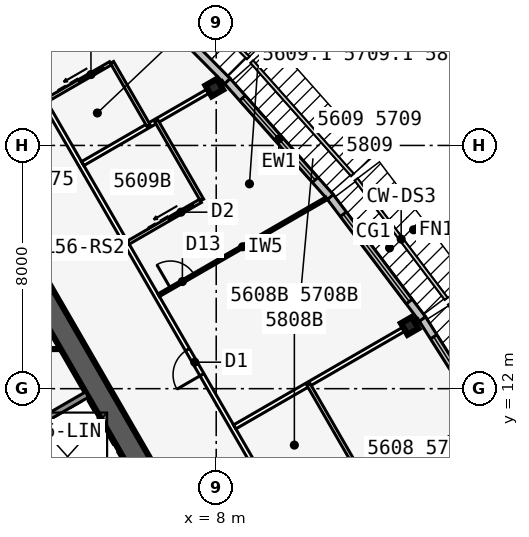
"""IFC4 building model, lengths in metres.
Left out: names, types, materials, properties, quantities, classifications, styles, units other than length and angle.
Written with IfcOpenShell. Run it as: python <this file> out.ifc"""

import sys

from ifc_helpers import new_model, si_unit, direction, frame, frame_2d, origin, origin_2d, place, context, subcontext, project, spatial, rectangle, i_section, extrude, element, fill, save


model = new_model("IFC4")
c1 = context("Model", 3, precision=1e-05, world=origin(), true_north=direction((0.0, 1.0)))
c2 = subcontext(c1, "Body", "Model", "MODEL_VIEW")
j1 = project(units=[si_unit("LENGTHUNIT", "METRE"), si_unit("PLANEANGLEUNIT", "RADIAN")], contexts=[c1])
p1 = place(None, origin())
s1 = spatial("IfcSite", under=j1, at=p1, CompositionType="ELEMENT")
p2 = place(p1, origin())
s2 = spatial("IfcBuilding", under=s1, at=p2, CompositionType="ELEMENT")
p3 = place(p2, frame((0.0, 0.0, 211.7)))
s3 = spatial("IfcBuildingStorey", under=s2, at=p3, CompositionType="ELEMENT", Elevation=211.7)
p4 = place(p3, frame((16.5, -9.526, 0.0), z_axis=(0.0, 0.0, 1.0), x_axis=(-0.499999749417, 0.866025548458, 0.0)))
e1 = element("IfcWall", 1, at=p4, inside=s3, PredefinedType="SHEAR", context=c2, shape_type="SweptSolid", body=[
    extrude(rectangle(XDim=33.0, YDim=0.75, at=frame_2d((16.5, 0.0))), origin(), (0.0, 0.0, 1.0), 3.6),
])
p5 = place(p4, frame((14.15, 0.0, 0.0)))
e2 = element("IfcOpeningElement", 2, at=p5, cuts=e1, PredefinedType="OPENING", context=c2, shape_type="SweptSolid", body=[
    extrude(rectangle(XDim=1.8, YDim=2.13, at=frame_2d((0.9, 1.065))), frame((0.0, 0.385, 0.0), z_axis=(0.0, -1.0, 0.0), x_axis=(1.0, 0.0, 0.0)), (0.0, 0.0, 1.0), 0.77),
])
p6 = place(p4, frame((12.6, 0.0, 0.0)))
e3 = element("IfcOpeningElement", 3, at=p6, cuts=e1, PredefinedType="OPENING", context=c2, shape_type="SweptSolid", body=[
    extrude(rectangle(XDim=1.0, YDim=2.13, at=frame_2d((0.5, 1.065))), frame((0.0, 0.385, 0.0), z_axis=(0.0, -1.0, 0.0), x_axis=(1.0, 0.0, 0.0)), (0.0, 0.0, 1.0), 0.77),
])
p7 = place(p3, frame((5.379, 2.586, 0.0), z_axis=(0.0, 0.0, 1.0), x_axis=(-0.500001375892, 0.866024609411, 0.0)))
e4 = element("IfcWall", 4, at=p7, inside=s3, PredefinedType="SOLIDWALL", context=c2, shape_type="SweptSolid", body=[
    extrude(rectangle(XDim=10.633, YDim=0.25, at=frame_2d((5.316, 0.0))), origin(), (0.0, 0.0, 1.0), 3.435),
])
p8 = place(p7, frame((9.164, 0.0, 0.0)))
e5 = element("IfcOpeningElement", 5, at=p8, cuts=e4, PredefinedType="OPENING", context=c2, shape_type="SweptSolid", body=[
    extrude(rectangle(XDim=0.9, YDim=2.13, at=frame_2d((0.45, 1.065))), frame((0.0, 0.135, 0.0), z_axis=(0.0, -1.0, 0.0), x_axis=(1.0, 0.0, 0.0)), (0.0, 0.0, 1.0), 0.27),
])
p9 = place(p7, frame((1.0, 0.0, 0.0)))
e6 = element("IfcOpeningElement", 6, at=p9, cuts=e4, PredefinedType="OPENING", context=c2, shape_type="SweptSolid", body=[
    extrude(rectangle(XDim=1.1, YDim=2.13, at=frame_2d((0.55, 1.065))), frame((0.0, 0.135, 0.0), z_axis=(0.0, -1.0, 0.0), x_axis=(1.0, 0.0, 0.0)), (0.0, 0.0, 1.0), 0.27),
])
p10 = place(p7, frame((3.9, 0.0, 0.0)))
e7 = element("IfcOpeningElement", 7, at=p10, cuts=e4, PredefinedType="OPENING", context=c2, shape_type="SweptSolid", body=[
    extrude(rectangle(XDim=1.1, YDim=2.13, at=frame_2d((0.55, 1.065))), frame((0.0, 0.135, 0.0), z_axis=(0.0, -1.0, 0.0), x_axis=(1.0, 0.0, 0.0)), (0.0, 0.0, 1.0), 0.27),
])
p11 = place(p7, frame((6.8, 0.0, 0.0)))
e8 = element("IfcOpeningElement", 8, at=p11, cuts=e4, PredefinedType="OPENING", context=c2, shape_type="SweptSolid", body=[
    extrude(rectangle(XDim=1.1, YDim=2.13, at=frame_2d((0.55, 1.065))), frame((0.0, 0.135, 0.0), z_axis=(0.0, -1.0, 0.0), x_axis=(1.0, 0.0, 0.0)), (0.0, 0.0, 1.0), 0.27),
])
p12 = place(p3, frame((0.979, 10.207, 0.0), z_axis=(0.0, 0.0, 1.0), x_axis=(0.866042017984, 0.499971222258, 0.0)))
e9 = element("IfcWall", 9, at=p12, inside=s3, PredefinedType="SOLIDWALL", context=c2, shape_type="SweptSolid", body=[
    extrude(rectangle(XDim=3.2, YDim=0.2, at=frame_2d((1.6, 0.0))), origin(), (0.0, 0.0, 1.0), 3.435),
])
for number, where, z_axis, x_axis in (
    (10, (14.363, 14.066, 0.0), (0.0, 0.0, 1.0), (0.866, 0.5, 0.0)),
    (11, (7.937, 21.903, 0.0), (0.0, 0.0, 1.0), (-0.5, 0.866, 0.0)),
):
    element("IfcColumn", number, at=place(p3, frame(where, z_axis=z_axis, x_axis=x_axis)), inside=s3, PredefinedType="COLUMN", context=c2, shape_type="SweptSolid", body=[
        extrude(i_section(OverallWidth=0.411, OverallDepth=0.434, WebThickness=0.036, FlangeThickness=0.057, at=origin_2d()), origin(), (0.0, 0.0, 1.0), 3.6),
    ])
p13 = place(p3, frame((15.312, 8.84, 0.0), z_axis=(0.0, 0.0, 1.0), x_axis=(0.866025403784, 0.5, 0.0)))
e12 = element("IfcColumn", 12, at=p13, inside=s3, PredefinedType="COLUMN", context=c2, shape_type="SweptSolid", body=[
    extrude(rectangle(XDim=2.3, YDim=2.3, at=origin_2d()), origin(), (0.0, 0.0, 1.0), 3.6),
])
p14 = place(p3, frame((17.456, 10.072, 0.0), z_axis=(0.0, 0.0, 1.0), x_axis=(-0.535220361449, 0.844712474568, 0.0)))
e13 = element("IfcWall", 13, at=p14, inside=s3, PredefinedType="STANDARD", context=c2, shape_type="SweptSolid", body=[
    extrude(rectangle(XDim=5.004, YDim=0.25, at=frame_2d((2.502, 0.0))), origin(), (0.0, 0.0, 1.0), 3.435),
])
p15 = place(p14, frame((0.702, 0.0, 0.45)))
e14 = element("IfcOpeningElement", 14, at=p15, cuts=e13, PredefinedType="OPENING", context=c2, shape_type="SweptSolid", body=[
    extrude(rectangle(XDim=3.6, YDim=2.6, at=frame_2d((1.8, 1.3))), frame((0.0, 0.135, 0.0), z_axis=(0.0, -1.0, 0.0), x_axis=(1.0, 0.0, 0.0)), (0.0, 0.0, 1.0), 0.27),
])
p16 = place(p3, frame((14.783, 14.291, 0.0), z_axis=(0.0, 0.0, 1.0), x_axis=(-0.602408653511, 0.798187831388, 0.0)))
e15 = element("IfcWall", 15, at=p16, inside=s3, PredefinedType="STANDARD", context=c2, shape_type="SweptSolid", body=[
    extrude(rectangle(XDim=5.038, YDim=0.25, at=frame_2d((2.519, 0.0))), origin(), (0.0, 0.0, 1.0), 3.435),
])
p17 = place(p16, frame((0.719, 0.0, 0.45)))
e16 = element("IfcOpeningElement", 16, at=p17, cuts=e15, PredefinedType="OPENING", context=c2, shape_type="SweptSolid", body=[
    extrude(rectangle(XDim=3.6, YDim=2.6, at=frame_2d((1.8, 1.3))), frame((0.0, 0.135, 0.0), z_axis=(0.0, -1.0, 0.0), x_axis=(1.0, 0.0, 0.0)), (0.0, 0.0, 1.0), 0.27),
])
p18 = place(p3, frame((11.754, 18.304, 0.0), z_axis=(0.0, 0.0, 1.0), x_axis=(-0.664348996191, 0.747422511876, 0.0)))
e17 = element("IfcWall", 17, at=p18, inside=s3, PredefinedType="STANDARD", context=c2, shape_type="SweptSolid", body=[
    extrude(rectangle(XDim=5.105, YDim=0.25, at=frame_2d((2.552, 0.0))), origin(), (0.0, 0.0, 1.0), 3.435),
])
p19 = place(p18, frame((0.752, 0.0, 0.45)))
e18 = element("IfcOpeningElement", 18, at=p19, cuts=e17, PredefinedType="OPENING", context=c2, shape_type="SweptSolid", body=[
    extrude(rectangle(XDim=3.6, YDim=2.6, at=frame_2d((1.8, 1.3))), frame((0.0, 0.135, 0.0), z_axis=(0.0, -1.0, 0.0), x_axis=(1.0, 0.0, 0.0)), (0.0, 0.0, 1.0), 0.27),
])
p20 = place(p3, frame((8.368, 22.115, 0.0), z_axis=(0.0, 0.0, 1.0), x_axis=(-0.704149946111, 0.710051303352, 0.0)))
e19 = element("IfcWall", 19, at=p20, inside=s3, PredefinedType="STANDARD", context=c2, shape_type="SweptSolid", body=[
    extrude(rectangle(XDim=2.069, YDim=0.25, at=frame_2d((1.034, 0.0))), origin(), (0.0, 0.0, 1.0), 3.435),
])
p21 = place(p3, frame((21.661, -12.015, 0.0), z_axis=(0.0, 0.0, 1.0), x_axis=(-0.500000605707, 0.866025054079, 0.0)))
e20 = element("IfcWall", 20, at=p21, inside=s3, PredefinedType="PARTITIONING", context=c2, shape_type="SweptSolid", body=[
    extrude(rectangle(XDim=42.472, YDim=0.15, at=frame_2d((21.236, 0.0))), origin(), (0.0, 0.0, 1.0), 3.435),
])
p22 = place(p21, frame((2.661, 0.0, 0.0)))
e21 = element("IfcOpeningElement", 21, at=p22, cuts=e20, PredefinedType="OPENING", context=c2, shape_type="SweptSolid", body=[
    extrude(rectangle(XDim=0.95, YDim=2.13, at=frame_2d((0.475, 1.065))), frame((0.0, 0.085, 0.0), z_axis=(0.0, -1.0, 0.0), x_axis=(1.0, 0.0, 0.0)), (0.0, 0.0, 1.0), 0.17),
])
p23 = place(p21, frame((7.061, 0.0, 0.0)))
e22 = element("IfcOpeningElement", 22, at=p23, cuts=e20, PredefinedType="OPENING", context=c2, shape_type="SweptSolid", body=[
    extrude(rectangle(XDim=0.95, YDim=2.13, at=frame_2d((0.475, 1.065))), frame((0.0, 0.085, 0.0), z_axis=(0.0, -1.0, 0.0), x_axis=(1.0, 0.0, 0.0)), (0.0, 0.0, 1.0), 0.17),
])
p24 = place(p21, frame((13.861, 0.0, 0.0)))
e23 = element("IfcOpeningElement", 23, at=p24, cuts=e20, PredefinedType="OPENING", context=c2, shape_type="SweptSolid", body=[
    extrude(rectangle(XDim=0.95, YDim=2.13, at=frame_2d((0.475, 1.065))), frame((0.0, 0.085, 0.0), z_axis=(0.0, -1.0, 0.0), x_axis=(1.0, 0.0, 0.0)), (0.0, 0.0, 1.0), 0.17),
])
p25 = place(p21, frame((22.061, 0.0, 0.0)))
e24 = element("IfcOpeningElement", 24, at=p25, cuts=e20, PredefinedType="OPENING", context=c2, shape_type="SweptSolid", body=[
    extrude(rectangle(XDim=0.95, YDim=2.13, at=frame_2d((0.475, 1.065))), frame((0.0, 0.085, 0.0), z_axis=(0.0, -1.0, 0.0), x_axis=(1.0, 0.0, 0.0)), (0.0, 0.0, 1.0), 0.17),
])
p26 = place(p21, frame((28.261, 0.0, 0.0)))
e25 = element("IfcOpeningElement", 25, at=p26, cuts=e20, PredefinedType="OPENING", context=c2, shape_type="SweptSolid", body=[
    extrude(rectangle(XDim=0.95, YDim=2.13, at=frame_2d((0.475, 1.065))), frame((0.0, 0.085, 0.0), z_axis=(0.0, -1.0, 0.0), x_axis=(1.0, 0.0, 0.0)), (0.0, 0.0, 1.0), 0.17),
])
p27 = place(p21, frame((38.861, 0.0, 0.0)))
e26 = element("IfcOpeningElement", 26, at=p27, cuts=e20, PredefinedType="OPENING", context=c2, shape_type="SweptSolid", body=[
    extrude(rectangle(XDim=0.95, YDim=2.13, at=frame_2d((0.475, 1.065))), frame((0.0, 0.085, 0.0), z_axis=(0.0, -1.0, 0.0), x_axis=(1.0, 0.0, 0.0)), (0.0, 0.0, 1.0), 0.17),
])
p28 = place(p3, frame((8.608, 10.743, 0.0), z_axis=(0.0, 0.0, 1.0), x_axis=(0.86604781716, 0.499961176886, 0.0)))
e27 = element("IfcWall", 27, at=p28, inside=s3, PredefinedType="PARTITIONING", context=c2, shape_type="SweptSolid", body=[
    extrude(rectangle(XDim=6.994, YDim=0.15, at=frame_2d((3.497, 0.0))), origin(), (0.0, 0.0, 1.0), 2.589),
])
p29 = place(p3, frame((6.108, 15.073, 0.0), z_axis=(0.0, 0.0, 1.0), x_axis=(0.866035028144, 0.499983329749, 0.0)))
e28 = element("IfcWall", 28, at=p29, inside=s3, PredefinedType="PARTITIONING", context=c2, shape_type="SweptSolid", body=[
    extrude(rectangle(XDim=6.373, YDim=0.1, at=frame_2d((3.187, 0.0))), origin(), (0.0, 0.0, 1.0), 2.589),
])
p30 = place(p29, frame((0.45, 0.0, 0.0)))
e29 = element("IfcOpeningElement", 29, at=p30, cuts=e28, PredefinedType="OPENING", context=c2, shape_type="SweptSolid", body=[
    extrude(rectangle(XDim=0.9, YDim=2.13, at=frame_2d((0.45, 1.065))), frame((0.0, 0.06, 0.0), z_axis=(0.0, -1.0, 0.0), x_axis=(1.0, 0.0, 0.0)), (0.0, 0.0, 1.0), 0.12),
])
p31 = place(p3, frame((3.608, 19.404, 0.0), z_axis=(0.0, 0.0, 1.0), x_axis=(0.866028745538, 0.499994211868, 0.0)))
e30 = element("IfcWall", 30, at=p31, inside=s3, PredefinedType="PARTITIONING", context=c2, shape_type="SweptSolid", body=[
    extrude(rectangle(XDim=5.34, YDim=0.15, at=frame_2d((2.67, 0.0))), origin(), (0.0, 0.0, 1.0), 2.589),
])
for number, where, z_axis, x_axis in (
    (31, (12.533, 9.545, 0.0), (0.0, 0.0, 1.0), (-0.5, 0.866, 0.0)),
    (32, (7.533, 18.205, 0.0), (0.0, 0.0, 1.0), (-0.5, 0.866, 0.0)),
):
    element("IfcWall", number, at=place(p3, frame(where, z_axis=z_axis, x_axis=x_axis)), inside=s3, PredefinedType="PLUMBINGWALL", context=c2, shape_type="SweptSolid", body=[
        extrude(rectangle(XDim=3.0, YDim=0.12, at=frame_2d((1.5, 0.0))), origin(), (0.0, 0.0, 1.0), 3.435),
    ])
p32 = place(p3, frame((5.108, 16.805, 0.0), z_axis=(0.0, 0.0, 1.0), x_axis=(0.866035715982, 0.499982138324, 0.0)))
e33 = element("IfcWall", 33, at=p32, inside=s3, PredefinedType="PLUMBINGWALL", context=c2, shape_type="SweptSolid", body=[
    extrude(rectangle(XDim=2.74, YDim=0.12, at=frame_2d((1.37, 0.0))), origin(), (0.0, 0.0, 1.0), 3.435),
])
p33 = place(p32, frame((1.55, 0.0, 0.0)))
e34 = element("IfcOpeningElement", 34, at=p33, cuts=e33, PredefinedType="OPENING", context=c2, shape_type="SweptSolid", body=[
    extrude(rectangle(XDim=0.9, YDim=2.13, at=frame_2d((0.45, 1.065))), frame((0.0, 0.07, 0.0), z_axis=(0.0, -1.0, 0.0), x_axis=(1.0, 0.0, 0.0)), (0.0, 0.0, 1.0), 0.14),
])
p34 = place(p3, frame((5.773, 20.654, 0.0), z_axis=(0.0, 0.0, 1.0), x_axis=(-0.500001309137, 0.866024647952, 0.0)))
e35 = element("IfcWall", 35, at=p34, inside=s3, PredefinedType="PLUMBINGWALL", context=c2, shape_type="SweptSolid", body=[
    extrude(rectangle(XDim=2.4, YDim=0.12, at=frame_2d((1.2, 0.0))), origin(), (0.0, 0.0, 1.0), 3.435),
])
p35 = place(p3, frame((2.408, 21.482, 0.0), z_axis=(0.0, 0.0, 1.0), x_axis=(0.866023955769, 0.500002508028, 0.0)))
e36 = element("IfcWall", 36, at=p35, inside=s3, PredefinedType="PLUMBINGWALL", context=c2, shape_type="SweptSolid", body=[
    extrude(rectangle(XDim=2.44, YDim=0.12, at=frame_2d((1.22, 0.0))), origin(), (0.0, 0.0, 1.0), 3.435),
])
p36 = place(p35, frame((1.25, 0.0, 0.0)))
e37 = element("IfcOpeningElement", 37, at=p36, cuts=e36, PredefinedType="OPENING", context=c2, shape_type="SweptSolid", body=[
    extrude(rectangle(XDim=0.9, YDim=2.13, at=frame_2d((0.45, 1.065))), frame((0.0, 0.07, 0.0), z_axis=(0.0, -1.0, 0.0), x_axis=(1.0, 0.0, 0.0)), (0.0, 0.0, 1.0), 0.14),
])
p37 = place(p3, frame((-2.887, 13.302, 0.0), z_axis=(0.0, 0.0, 1.0), x_axis=(1.0, 0.0, 0.0)))
e38 = element("IfcWall", 38, at=p37, inside=s3, PredefinedType="PARTITIONING", context=c2, shape_type="SweptSolid", body=[
    extrude(rectangle(XDim=5.773, YDim=0.1, at=frame_2d((2.887, 0.0))), origin(), (0.0, 0.0, 1.0), 3.435),
])
p38 = place(p37, frame((2.437, 0.0, 0.0)))
e39 = element("IfcOpeningElement", 39, at=p38, cuts=e38, PredefinedType="OPENING", context=c2, shape_type="SweptSolid", body=[
    extrude(rectangle(XDim=0.9, YDim=2.13, at=frame_2d((0.45, 1.065))), frame((0.0, 0.06, 0.0), z_axis=(0.0, -1.0, 0.0), x_axis=(1.0, 0.0, 0.0)), (0.0, 0.0, 1.0), 0.12),
])
p39 = place(p15, origin())
e40 = element("IfcWindow", 40, at=p39, inside=s3, PartitioningType="SINGLE_PANEL", PredefinedType="WINDOW", context=c2, shape_type="SweptSolid", body=[
    extrude(rectangle(XDim=3.6, YDim=2.6, at=frame_2d((1.8, 1.3))), frame((0.0, 0.03, 0.0), z_axis=(0.0, -1.0, 0.0), x_axis=(1.0, 0.0, 0.0)), (0.0, 0.0, 1.0), 0.06),
])
fill(e14, e40)
p40 = place(p17, origin())
e41 = element("IfcWindow", 41, at=p40, inside=s3, PartitioningType="SINGLE_PANEL", PredefinedType="WINDOW", context=c2, shape_type="SweptSolid", body=[
    extrude(rectangle(XDim=3.6, YDim=2.6, at=frame_2d((1.8, 1.3))), frame((0.0, 0.03, 0.0), z_axis=(0.0, -1.0, 0.0), x_axis=(1.0, 0.0, 0.0)), (0.0, 0.0, 1.0), 0.06),
])
fill(e16, e41)
p41 = place(p19, origin())
e42 = element("IfcWindow", 42, at=p41, inside=s3, PartitioningType="SINGLE_PANEL", PredefinedType="WINDOW", context=c2, shape_type="SweptSolid", body=[
    extrude(rectangle(XDim=3.6, YDim=2.6, at=frame_2d((1.8, 1.3))), frame((0.0, 0.03, 0.0), z_axis=(0.0, -1.0, 0.0), x_axis=(1.0, 0.0, 0.0)), (0.0, 0.0, 1.0), 0.06),
])
fill(e18, e42)
p42 = place(p30, origin())
e43 = element("IfcDoor", 43, at=p42, inside=s3, OperationType="SINGLE_SWING_LEFT", PredefinedType="DOOR", context=c2, shape_type="SweptSolid", body=[
    extrude(rectangle(XDim=0.9, YDim=2.13, at=frame_2d((0.45, 1.065))), frame((0.0, 0.025, 0.0), z_axis=(0.0, -1.0, 0.0), x_axis=(1.0, 0.0, 0.0)), (0.0, 0.0, 1.0), 0.05),
])
fill(e29, e43)
p43 = place(p26, origin())
e44 = element("IfcDoor", 44, at=p43, inside=s3, OperationType="SINGLE_SWING_LEFT", PredefinedType="DOOR", context=c2, shape_type="SweptSolid", body=[
    extrude(rectangle(XDim=0.95, YDim=2.13, at=frame_2d((0.475, 1.065))), frame((0.0, 0.025, 0.0), z_axis=(0.0, -1.0, 0.0), x_axis=(1.0, 0.0, 0.0)), (0.0, 0.0, 1.0), 0.05),
])
fill(e25, e44)
p44 = place(p33, origin())
e45 = element("IfcDoor", 45, at=p44, inside=s3, OperationType="SLIDING_TO_LEFT", PredefinedType="DOOR", context=c2, shape_type="SweptSolid", body=[
    extrude(rectangle(XDim=0.9, YDim=2.13, at=frame_2d((0.45, 1.065))), frame((0.0, 0.025, 0.0), z_axis=(0.0, -1.0, 0.0), x_axis=(1.0, 0.0, 0.0)), (0.0, 0.0, 1.0), 0.05),
])
fill(e34, e45)
p45 = place(p36, origin())
e46 = element("IfcDoor", 46, at=p45, inside=s3, OperationType="SLIDING_TO_LEFT", PredefinedType="DOOR", context=c2, shape_type="SweptSolid", body=[
    extrude(rectangle(XDim=0.9, YDim=2.13, at=frame_2d((0.45, 1.065))), frame((0.0, 0.025, 0.0), z_axis=(0.0, -1.0, 0.0), x_axis=(1.0, 0.0, 0.0)), (0.0, 0.0, 1.0), 0.05),
])
fill(e37, e46)
save(model, sys.argv[1])
